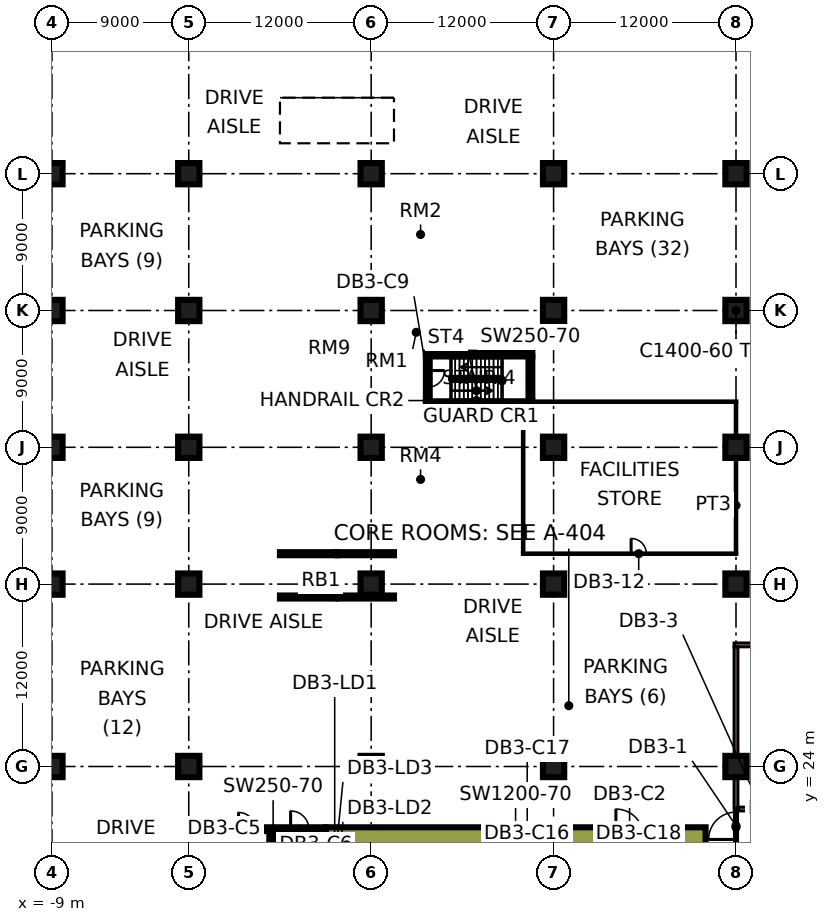
"""IFC4 building model, lengths in metres.
Left out: names, types, materials, properties, quantities, classifications, styles, units other than length and angle.
Written with IfcOpenShell. Run it as: python <this file> out.ifc"""

import sys

from ifc_helpers import new_model, si_unit, direction, frame, frame_2d, origin, origin_2d, place, context, subcontext, project, spatial, rectangle, extrude, element, fill, save


model = new_model("IFC4")
c1 = context("Model", 3, precision=1e-05, world=origin(), true_north=direction((0.0, 1.0)))
c2 = subcontext(c1, "Body", "Model", "MODEL_VIEW")
j1 = project(units=[si_unit("LENGTHUNIT", "METRE"), si_unit("PLANEANGLEUNIT", "RADIAN")], contexts=[c1])
p1 = place(None, origin())
s1 = spatial("IfcSite", under=j1, at=p1, CompositionType="ELEMENT")
p2 = place(p1, origin())
s2 = spatial("IfcBuilding", under=s1, at=p2, CompositionType="ELEMENT")
p3 = place(p2, frame((0.0, 0.0, -13.5)))
s3 = spatial("IfcBuildingStorey", under=s2, at=p3, CompositionType="ELEMENT", Elevation=-13.5)
for number, where, z_axis, x_axis in (
    (1, (-9.0, 24.0, 0.0), (0.0, 0.0, 1.0), (1.0, 0.0, 0.0)),
    (2, (-9.0, 36.0, 0.0), (0.0, 0.0, 1.0), (1.0, 0.0, 0.0)),
    (3, (-9.0, 45.0, 0.0), (0.0, 0.0, 1.0), (1.0, 0.0, 0.0)),
    (4, (-9.0, 54.0, 0.0), (0.0, 0.0, 1.0), (1.0, 0.0, 0.0)),
    (5, (-9.0, 63.0, 0.0), (0.0, 0.0, 1.0), (1.0, 0.0, 0.0)),
    (6, (0.0, 24.0, 0.0), (0.0, 0.0, 1.0), (1.0, 0.0, 0.0)),
    (7, (0.0, 36.0, 0.0), (0.0, 0.0, 1.0), (1.0, 0.0, 0.0)),
    (8, (0.0, 45.0, 0.0), (0.0, 0.0, 1.0), (1.0, 0.0, 0.0)),
    (9, (0.0, 54.0, 0.0), (0.0, 0.0, 1.0), (1.0, 0.0, 0.0)),
    (10, (0.0, 63.0, 0.0), (0.0, 0.0, 1.0), (1.0, 0.0, 0.0)),
    (11, (12.0, 24.0, 0.0), (0.0, 0.0, 1.0), (1.0, 0.0, 0.0)),
    (12, (12.0, 36.0, 0.0), (0.0, 0.0, 1.0), (1.0, 0.0, 0.0)),
    (13, (12.0, 45.0, 0.0), (0.0, 0.0, 1.0), (1.0, 0.0, 0.0)),
    (14, (12.0, 54.0, 0.0), (0.0, 0.0, 1.0), (1.0, 0.0, 0.0)),
    (15, (12.0, 63.0, 0.0), (0.0, 0.0, 1.0), (1.0, 0.0, 0.0)),
    (16, (24.0, 24.0, 0.0), (0.0, 0.0, 1.0), (1.0, 0.0, 0.0)),
    (17, (24.0, 36.0, 0.0), (0.0, 0.0, 1.0), (1.0, 0.0, 0.0)),
    (18, (24.0, 45.0, 0.0), (0.0, 0.0, 1.0), (1.0, 0.0, 0.0)),
    (19, (24.0, 54.0, 0.0), (0.0, 0.0, 1.0), (1.0, 0.0, 0.0)),
    (20, (24.0, 63.0, 0.0), (0.0, 0.0, 1.0), (1.0, 0.0, 0.0)),
    (21, (36.0, 24.0, 0.0), (0.0, 0.0, 1.0), (1.0, 0.0, 0.0)),
    (22, (36.0, 36.0, 0.0), (0.0, 0.0, 1.0), (1.0, 0.0, 0.0)),
    (23, (36.0, 45.0, 0.0), (0.0, 0.0, 1.0), (1.0, 0.0, 0.0)),
    (24, (36.0, 54.0, 0.0), (0.0, 0.0, 1.0), (1.0, 0.0, 0.0)),
    (25, (36.0, 63.0, 0.0), (0.0, 0.0, 1.0), (1.0, 0.0, 0.0)),
):
    element("IfcColumn", number, at=place(p3, frame(where, z_axis=z_axis, x_axis=x_axis)), inside=s3, PredefinedType="COLUMN", context=c2, shape_type="SweptSolid", body=[
        extrude(rectangle(XDim=1.4, YDim=1.4, at=origin_2d()), origin(), (0.0, 0.0, 1.0), 4.5),
    ])
p4 = place(p3, frame((9.0, 19.4, 0.0), z_axis=(0.0, 0.0, 1.0), x_axis=(1.0, 0.0, 0.0)))
e26 = element("IfcWall", 26, at=p4, inside=s3, PredefinedType="SHEAR", context=c2, shape_type="SweptSolid", body=[
    extrude(rectangle(XDim=25.0, YDim=1.2, at=frame_2d((12.5, 0.0))), origin(), (0.0, 0.0, 1.0), 4.5),
])
p5 = place(p4, frame((19.1, 0.0, 0.0)))
e27 = element("IfcOpeningElement", 27, at=p5, cuts=e26, PredefinedType="OPENING", context=c2, shape_type="SweptSolid", body=[
    extrude(rectangle(XDim=1.8, YDim=2.4, at=frame_2d((0.9, 1.2))), frame((0.0, 0.61, 0.0), z_axis=(0.0, -1.0, 0.0), x_axis=(1.0, 0.0, 0.0)), (0.0, 0.0, 1.0), 1.22),
])
p6 = place(p3, frame((2.1, 19.875, 0.0), z_axis=(0.0, 0.0, 1.0), x_axis=(1.0, 0.0, 0.0)))
e28 = element("IfcWall", 28, at=p6, inside=s3, PredefinedType="SHEAR", context=c2, shape_type="SweptSolid", body=[
    extrude(rectangle(XDim=6.9, YDim=0.25, at=frame_2d((3.45, 0.0))), origin(), (0.0, 0.0, 1.0), 4.5),
])
p7 = place(p6, frame((1.175, 0.0, 0.0)))
e29 = element("IfcOpeningElement", 29, at=p7, cuts=e28, PredefinedType="OPENING", context=c2, shape_type="SweptSolid", body=[
    extrude(rectangle(XDim=1.1, YDim=2.2, at=frame_2d((0.55, 1.1))), frame((0.0, 0.135, 0.0), z_axis=(0.0, -1.0, 0.0), x_axis=(1.0, 0.0, 0.0)), (0.0, 0.0, 1.0), 0.27),
])
p8 = place(p6, frame((4.6, 0.0, 0.0)))
e30 = element("IfcOpeningElement", 30, at=p8, cuts=e28, PredefinedType="OPENING", context=c2, shape_type="SweptSolid", body=[
    extrude(rectangle(XDim=1.2, YDim=2.2, at=frame_2d((0.6, 1.1))), frame((0.0, 0.135, 0.0), z_axis=(0.0, -1.0, 0.0), x_axis=(1.0, 0.0, 0.0)), (0.0, 0.0, 1.0), 0.27),
])
p9 = place(p3, frame((2.225, 13.25, 0.0), z_axis=(0.0, 0.0, 1.0), x_axis=(0.0, 1.0, 0.0)))
e31 = element("IfcWall", 31, at=p9, inside=s3, PredefinedType="SHEAR", context=c2, shape_type="SweptSolid", body=[
    extrude(rectangle(XDim=6.5, YDim=0.25, at=frame_2d((3.25, 0.0))), origin(), (0.0, 0.0, 1.0), 4.5),
])
p10 = place(p3, frame((5.425, 13.25, 0.0), z_axis=(0.0, 0.0, 1.0), x_axis=(0.0, 1.0, 0.0)))
e32 = element("IfcWall", 32, at=p10, inside=s3, PredefinedType="SHEAR", context=c2, shape_type="SweptSolid", body=[
    extrude(rectangle(XDim=6.5, YDim=0.25, at=frame_2d((3.25, 0.0))), origin(), (0.0, 0.0, 1.0), 4.5),
])
p11 = place(p10, frame((5.25, 0.0, 0.0)))
e33 = element("IfcOpeningElement", 33, at=p11, cuts=e32, PredefinedType="OPENING", context=c2, shape_type="SweptSolid", body=[
    extrude(rectangle(XDim=1.1, YDim=2.2, at=frame_2d((0.55, 1.1))), frame((0.0, 0.135, 0.0), z_axis=(0.0, -1.0, 0.0), x_axis=(1.0, 0.0, 0.0)), (0.0, 0.0, 1.0), 0.27),
])
for number, where, z_axis, x_axis in (
    (34, (15.6, 47.9, 0.0), (0.0, 0.0, 1.0), (1.0, 0.0, 0.0)),
    (35, (15.6, 51.1, 0.0), (0.0, 0.0, 1.0), (1.0, 0.0, 0.0)),
):
    element("IfcWall", number, at=place(p3, frame(where, z_axis=z_axis, x_axis=x_axis)), inside=s3, PredefinedType="SHEAR", context=c2, shape_type="SweptSolid", body=[
        extrude(rectangle(XDim=7.0, YDim=0.25, at=frame_2d((3.5, 0.0))), origin(), (0.0, 0.0, 1.0), 4.5),
    ])
p12 = place(p3, frame((15.725, 48.025, 0.0), z_axis=(0.0, 0.0, 1.0), x_axis=(0.0, 1.0, 0.0)))
e36 = element("IfcWall", 36, at=p12, inside=s3, PredefinedType="SHEAR", context=c2, shape_type="SweptSolid", body=[
    extrude(rectangle(XDim=2.95, YDim=0.25, at=frame_2d((1.475, 0.0))), origin(), (0.0, 0.0, 1.0), 4.5),
])
p13 = place(p12, frame((0.925, 0.0, 0.0)))
e37 = element("IfcOpeningElement", 37, at=p13, cuts=e36, PredefinedType="OPENING", context=c2, shape_type="SweptSolid", body=[
    extrude(rectangle(XDim=1.1, YDim=2.2, at=frame_2d((0.55, 1.1))), frame((0.0, 0.135, 0.0), z_axis=(0.0, -1.0, 0.0), x_axis=(1.0, 0.0, 0.0)), (0.0, 0.0, 1.0), 0.27),
])
p14 = place(p3, frame((22.475, 48.025, 0.0), z_axis=(0.0, 0.0, 1.0), x_axis=(0.0, 1.0, 0.0)))
e38 = element("IfcWall", 38, at=p14, inside=s3, PredefinedType="SHEAR", context=c2, shape_type="SweptSolid", body=[
    extrude(rectangle(XDim=2.95, YDim=0.25, at=frame_2d((1.475, 0.0))), origin(), (0.0, 0.0, 1.0), 4.5),
])
p15 = place(p3, frame((-6.294, 83.717, 0.0), z_axis=(0.0, 0.0, 1.0), x_axis=(-0.707112814855, -0.707100747466, 0.0)))
e39 = element("IfcWall", 39, at=p15, inside=s3, PredefinedType="SOLIDWALL", context=c2, shape_type="SweptSolid", body=[
    extrude(rectangle(XDim=20.231, YDim=0.8, at=frame_2d((10.116, 0.0))), origin(), (0.0, 0.0, 1.0), 4.5),
])
for number, where, z_axis, x_axis in (
    (40, (6.0, 38.0, 0.0), (0.0, 0.0, 1.0), (1.0, 0.0, 0.0)),
    (41, (9.75, 38.0, 0.0), (0.0, 0.0, 1.0), (1.0, 0.0, 0.0)),
):
    element("IfcWall", number, at=place(p3, frame(where, z_axis=z_axis, x_axis=x_axis)), inside=s3, PredefinedType="SOLIDWALL", context=c2, shape_type="SweptSolid", body=[
        extrude(rectangle(XDim=3.75, YDim=0.2, at=frame_2d((1.875, 0.0))), origin(), (0.0, 0.0, 1.0), 3.95),
    ])
p16 = place(p3, frame((6.0, 35.15, 0.0), z_axis=(0.0, 0.0, 1.0), x_axis=(1.0, 0.0, 0.0)))
e42 = element("IfcWall", 42, at=p16, inside=s3, PredefinedType="SOLIDWALL", context=c2, shape_type="SweptSolid", body=[
    extrude(rectangle(XDim=7.5, YDim=0.2, at=frame_2d((3.75, 0.0))), origin(), (0.0, 0.0, 1.0), 4.188),
])
p17 = place(p3, frame((21.95, 38.0, 0.0), z_axis=(0.0, 0.0, 1.0), x_axis=(1.0, 0.0, 0.0)))
e43 = element("IfcWall", 43, at=p17, inside=s3, PredefinedType="PARTITIONING", context=c2, shape_type="SweptSolid", body=[
    extrude(rectangle(XDim=14.1, YDim=0.1, at=frame_2d((7.05, 0.0))), origin(), (0.0, 0.0, 1.0), 4.05),
])
p18 = place(p17, frame((7.15, 0.0, 0.0)))
e44 = element("IfcOpeningElement", 44, at=p18, cuts=e43, PredefinedType="OPENING", context=c2, shape_type="SweptSolid", body=[
    extrude(rectangle(XDim=1.0, YDim=2.1, at=frame_2d((0.5, 1.05))), frame((0.0, 0.06, 0.0), z_axis=(0.0, -1.0, 0.0), x_axis=(1.0, 0.0, 0.0)), (0.0, 0.0, 1.0), 0.12),
])
p19 = place(p3, frame((22.0, 38.05, 0.0), z_axis=(0.0, 0.0, 1.0), x_axis=(0.0, 1.0, 0.0)))
e45 = element("IfcWall", 45, at=p19, inside=s3, PredefinedType="PARTITIONING", context=c2, shape_type="SweptSolid", body=[
    extrude(rectangle(XDim=9.725, YDim=0.1, at=frame_2d((4.862, 0.0))), origin(), (0.0, 0.0, 1.0), 4.05),
])
p20 = place(p3, frame((22.6, 48.0, 0.0), z_axis=(0.0, 0.0, 1.0), x_axis=(1.0, 0.0, 0.0)))
e46 = element("IfcWall", 46, at=p20, inside=s3, PredefinedType="PARTITIONING", context=c2, shape_type="SweptSolid", body=[
    extrude(rectangle(XDim=13.45, YDim=0.1, at=frame_2d((6.725, 0.0))), origin(), (0.0, 0.0, 1.0), 4.05),
])
p21 = place(p3, frame((35.875, 32.0, 0.0), z_axis=(0.0, 0.0, 1.0), x_axis=(1.0, 0.0, 0.0)))
e47 = element("IfcWall", 47, at=p21, inside=s3, PredefinedType="PARTITIONING", context=c2, shape_type="SweptSolid", body=[
    extrude(rectangle(XDim=40.25, YDim=0.25, at=frame_2d((20.125, 0.0))), origin(), (0.0, 0.0, 1.0), 4.05),
])
p22 = place(p3, frame((36.0, 18.8, 0.0), z_axis=(0.0, 0.0, 1.0), x_axis=(0.0, 1.0, 0.0)))
e48 = element("IfcWall", 48, at=p22, inside=s3, PredefinedType="PARTITIONING", context=c2, shape_type="SweptSolid", body=[
    extrude(rectangle(XDim=2.4, YDim=0.2, at=frame_2d((1.2, 0.0))), origin(), (0.0, 0.0, 1.0), 4.05),
])
p23 = place(p22, frame((0.4, 0.0, 0.0)))
e49 = element("IfcOpeningElement", 49, at=p23, cuts=e48, PredefinedType="OPENING", context=c2, shape_type="SweptSolid", body=[
    extrude(rectangle(XDim=1.8, YDim=2.1, at=frame_2d((0.9, 1.05))), frame((0.0, 0.11, 0.0), z_axis=(0.0, -1.0, 0.0), x_axis=(1.0, 0.0, 0.0)), (0.0, 0.0, 1.0), 0.22),
])
p24 = place(p3, frame((36.0, 21.2, 0.0), z_axis=(0.0, 0.0, 1.0), x_axis=(0.0, 1.0, 0.0)))
e50 = element("IfcWall", 50, at=p24, inside=s3, PredefinedType="PARTITIONING", context=c2, shape_type="SweptSolid", body=[
    extrude(rectangle(XDim=2.101, YDim=0.25, at=frame_2d((1.051, 0.0))), origin(), (0.0, 0.0, 1.0), 4.05),
])
p25 = place(p3, frame((36.0, 24.699, 0.0), z_axis=(0.0, 0.0, 1.0), x_axis=(0.0, 1.0, 0.0)))
e51 = element("IfcWall", 51, at=p25, inside=s3, PredefinedType="PARTITIONING", context=c2, shape_type="SweptSolid", body=[
    extrude(rectangle(XDim=7.176, YDim=0.25, at=frame_2d((3.588, 0.0))), origin(), (0.0, 0.0, 1.0), 4.05),
])
p26 = place(p3, frame((36.0, 38.05, 0.0), z_axis=(0.0, 0.0, 1.0), x_axis=(0.0, 1.0, 0.0)))
e52 = element("IfcWall", 52, at=p26, inside=s3, PredefinedType="PARTITIONING", context=c2, shape_type="SweptSolid", body=[
    extrude(rectangle(XDim=6.251, YDim=0.1, at=frame_2d((3.125, 0.0))), origin(), (0.0, 0.0, 1.0), 4.05),
])
p27 = place(p3, frame((36.0, 45.699, 0.0), z_axis=(0.0, 0.0, 1.0), x_axis=(0.0, 1.0, 0.0)))
e53 = element("IfcWall", 53, at=p27, inside=s3, PredefinedType="PARTITIONING", context=c2, shape_type="SweptSolid", body=[
    extrude(rectangle(XDim=2.251, YDim=0.1, at=frame_2d((1.125, 0.0))), origin(), (0.0, 0.0, 1.0), 4.05),
])
p28 = place(p3, frame((36.125, 21.2, 0.0), z_axis=(0.0, 0.0, 1.0), x_axis=(1.0, 0.0, 0.0)))
e54 = element("IfcWall", 54, at=p28, inside=s3, PredefinedType="PARTITIONING", context=c2, shape_type="SweptSolid", body=[
    extrude(rectangle(XDim=5.375, YDim=0.25, at=frame_2d((2.688, 0.0))), origin(), (0.0, 0.0, 1.0), 4.05),
])
p29 = place(p28, frame((2.025, 0.0, 0.0)))
e55 = element("IfcOpeningElement", 55, at=p29, cuts=e54, PredefinedType="OPENING", context=c2, shape_type="SweptSolid", body=[
    extrude(rectangle(XDim=1.2, YDim=2.1, at=frame_2d((0.6, 1.05))), frame((0.0, 0.135, 0.0), z_axis=(0.0, -1.0, 0.0), x_axis=(1.0, 0.0, 0.0)), (0.0, 0.0, 1.0), 0.27),
])
p30 = place(p5, origin())
e56 = element("IfcDoor", 56, at=p30, inside=s3, OperationType="DOUBLE_DOOR_SINGLE_SWING", PredefinedType="DOOR", context=c2, shape_type="SweptSolid", body=[
    extrude(rectangle(XDim=1.8, YDim=2.4, at=frame_2d((0.9, 1.2))), frame((0.0, 0.025, 0.0), z_axis=(0.0, -1.0, 0.0), x_axis=(1.0, 0.0, 0.0)), (0.0, 0.0, 1.0), 0.05),
])
fill(e27, e56)
p31 = place(p11, origin())
e57 = element("IfcDoor", 57, at=p31, inside=s3, OperationType="SINGLE_SWING_RIGHT", PredefinedType="DOOR", context=c2, shape_type="SweptSolid", body=[
    extrude(rectangle(XDim=1.1, YDim=2.2, at=frame_2d((0.55, 1.1))), frame((0.0, 0.025, 0.0), z_axis=(0.0, -1.0, 0.0), x_axis=(1.0, 0.0, 0.0)), (0.0, 0.0, 1.0), 0.05),
])
fill(e33, e57)
p32 = place(p7, origin())
e58 = element("IfcDoor", 58, at=p32, inside=s3, OperationType="SINGLE_SWING_LEFT", PredefinedType="DOOR", context=c2, shape_type="SweptSolid", body=[
    extrude(rectangle(XDim=1.1, YDim=2.2, at=frame_2d((0.55, 1.1))), frame((0.0, 0.025, 0.0), z_axis=(0.0, -1.0, 0.0), x_axis=(1.0, 0.0, 0.0)), (0.0, 0.0, 1.0), 0.05),
])
fill(e29, e58)
p33 = place(p8, origin())
e59 = element("IfcDoor", 59, at=p33, inside=s3, OperationType="SINGLE_SWING_LEFT", PredefinedType="DOOR", context=c2, shape_type="SweptSolid", body=[
    extrude(rectangle(XDim=1.2, YDim=2.2, at=frame_2d((0.6, 1.1))), frame((0.0, 0.025, 0.0), z_axis=(0.0, -1.0, 0.0), x_axis=(1.0, 0.0, 0.0)), (0.0, 0.0, 1.0), 0.05),
])
fill(e30, e59)
p34 = place(p13, origin())
e60 = element("IfcDoor", 60, at=p34, inside=s3, OperationType="SINGLE_SWING_RIGHT", PredefinedType="DOOR", context=c2, shape_type="SweptSolid", body=[
    extrude(rectangle(XDim=1.1, YDim=2.2, at=frame_2d((0.55, 1.1))), frame((0.0, 0.025, 0.0), z_axis=(0.0, -1.0, 0.0), x_axis=(1.0, 0.0, 0.0)), (0.0, 0.0, 1.0), 0.05),
])
fill(e37, e60)
p35 = place(p23, origin())
e61 = element("IfcDoor", 61, at=p35, inside=s3, OperationType="DOUBLE_DOOR_SINGLE_SWING", PredefinedType="DOOR", context=c2, shape_type="SweptSolid", body=[
    extrude(rectangle(XDim=1.8, YDim=2.1, at=frame_2d((0.9, 1.05))), frame((0.0, 0.025, 0.0), z_axis=(0.0, -1.0, 0.0), x_axis=(1.0, 0.0, 0.0)), (0.0, 0.0, 1.0), 0.05),
])
fill(e49, e61)
p36 = place(p18, origin())
e62 = element("IfcDoor", 62, at=p36, inside=s3, OperationType="SINGLE_SWING_LEFT", PredefinedType="DOOR", context=c2, shape_type="SweptSolid", body=[
    extrude(rectangle(XDim=1.0, YDim=2.1, at=frame_2d((0.5, 1.05))), frame((0.0, 0.025, 0.0), z_axis=(0.0, -1.0, 0.0), x_axis=(1.0, 0.0, 0.0)), (0.0, 0.0, 1.0), 0.05),
])
fill(e44, e62)
save(model, sys.argv[1])
